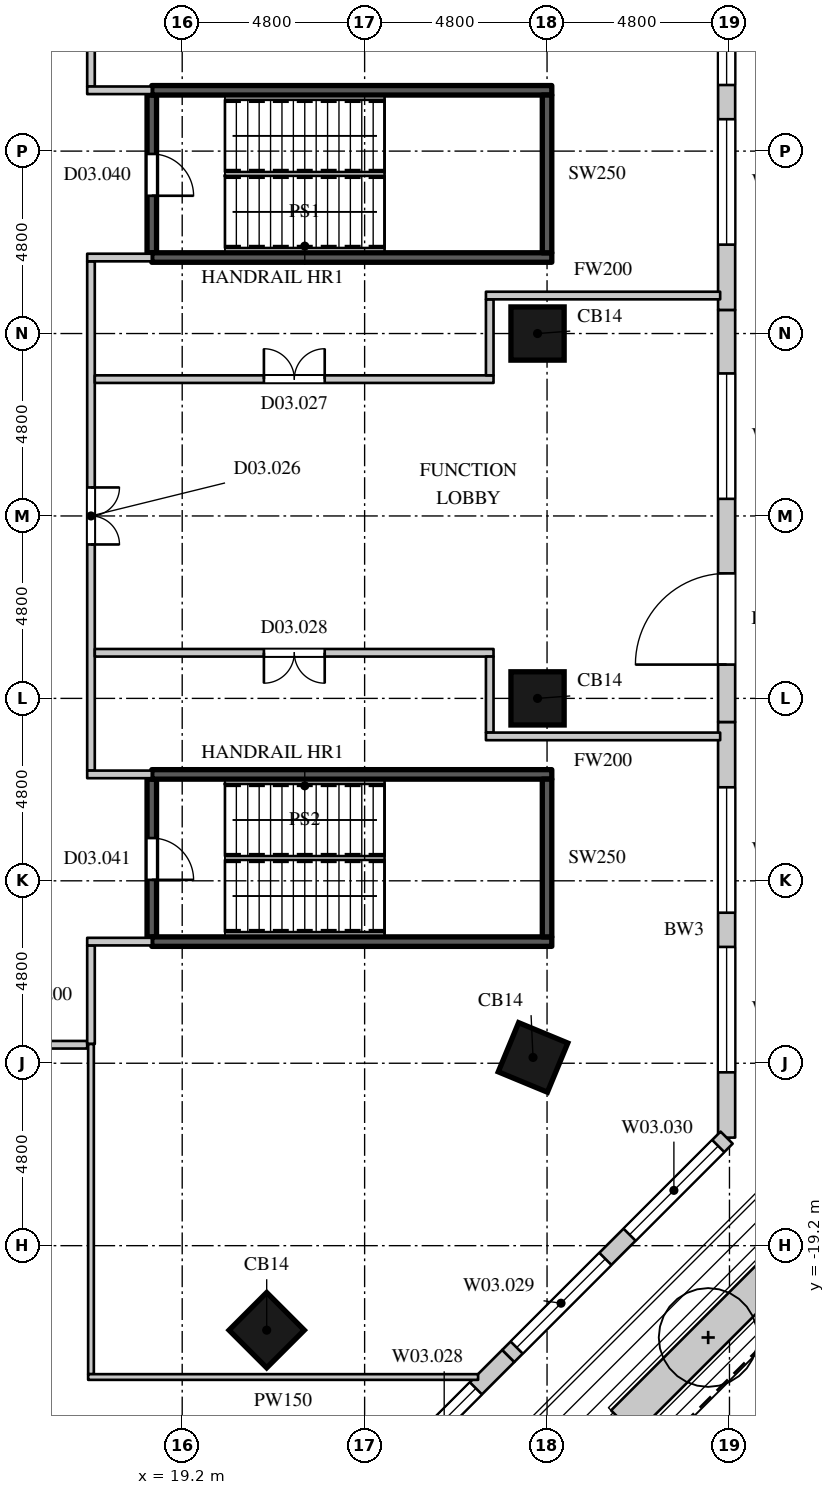
"""IFC4 building model, lengths in metres.
Left out: names, types, materials, properties, quantities, classifications, styles, units other than length and angle.
Written with IfcOpenShell. Run it as: python <this file> out.ifc"""

import sys

from ifc_helpers import new_model, si_unit, direction, frame, frame_2d, origin, origin_2d, place, context, subcontext, project, spatial, rectangle, extrude, element, fill, save


model = new_model("IFC4")
c1 = context("Model", 3, precision=1e-05, world=origin(), true_north=direction((0.0, 1.0)))
c2 = subcontext(c1, "Body", "Model", "MODEL_VIEW")
j1 = project(units=[si_unit("LENGTHUNIT", "METRE"), si_unit("PLANEANGLEUNIT", "RADIAN")], contexts=[c1])
p1 = place(None, origin())
s1 = spatial("IfcSite", under=j1, at=p1, CompositionType="ELEMENT")
p2 = place(p1, origin())
s2 = spatial("IfcBuilding", under=s1, at=p2, CompositionType="ELEMENT")
p3 = place(p2, frame((0.0, 0.0, 16.0)))
s3 = spatial("IfcBuildingStorey", under=s2, at=p3, CompositionType="ELEMENT", Elevation=16.0)
for number, where, z_axis, x_axis in (
    (1, (21.423, -21.423, 0.0), (0.0, 0.0, 1.0), (0.707, 0.707, 0.0)),
    (2, (28.431, -14.247, 0.0), (0.0, 0.0, 1.0), (0.383, 0.924, 0.0)),
    (3, (28.55, -4.8, 0.0), (0.0, 0.0, 1.0), (0.0, 1.0, 0.0)),
    (4, (28.55, 4.8, 0.0), (0.0, 0.0, 1.0), (0.0, 1.0, 0.0)),
):
    element("IfcColumn", number, at=place(p3, frame(where, z_axis=z_axis, x_axis=x_axis)), inside=s3, PredefinedType="COLUMN", context=c2, shape_type="SweptSolid", body=[
        extrude(rectangle(XDim=1.4, YDim=1.4, at=origin_2d()), origin(), (0.0, 0.0, 1.0), 5.0),
    ])
p4 = place(p3, frame((33.525, -16.357, 0.0), z_axis=(0.0, 0.0, 1.0), x_axis=(0.0, 1.0, 0.0)))
e5 = element("IfcWall", 5, at=p4, inside=s3, PredefinedType="ELEMENTEDWALL", context=c2, shape_type="SweptSolid", body=[
    extrude(rectangle(XDim=10.936, YDim=0.45, at=frame_2d((5.468, 0.0))), origin(), (0.0, 0.0, 1.0), 4.7),
])
p5 = place(p4, frame((1.718, 0.0, 1.05)))
e6 = element("IfcOpeningElement", 6, at=p5, cuts=e5, PredefinedType="OPENING", context=c2, shape_type="SweptSolid", body=[
    extrude(rectangle(XDim=3.3, YDim=2.7, at=frame_2d((1.65, 1.35))), frame((0.0, 0.235, 0.0), z_axis=(0.0, -1.0, 0.0), x_axis=(1.0, 0.0, 0.0)), (0.0, 0.0, 1.0), 0.47),
])
p6 = place(p4, frame((5.918, 0.0, 1.05)))
e7 = element("IfcOpeningElement", 7, at=p6, cuts=e5, PredefinedType="OPENING", context=c2, shape_type="SweptSolid", body=[
    extrude(rectangle(XDim=3.3, YDim=2.7, at=frame_2d((1.65, 1.35))), frame((0.0, 0.235, 0.0), z_axis=(0.0, -1.0, 0.0), x_axis=(1.0, 0.0, 0.0)), (0.0, 0.0, 1.0), 0.47),
])
p7 = place(p3, frame((33.525, -5.421, 0.0), z_axis=(0.0, 0.0, 1.0), x_axis=(0.0, 1.0, 0.0)))
e8 = element("IfcWall", 8, at=p7, inside=s3, PredefinedType="ELEMENTEDWALL", context=c2, shape_type="SweptSolid", body=[
    extrude(rectangle(XDim=10.843, YDim=0.45, at=frame_2d((5.421, 0.0))), origin(), (0.0, 0.0, 1.0), 4.7),
])
p8 = place(p7, frame((1.511, 0.0, 0.0)))
e9 = element("IfcOpeningElement", 9, at=p8, cuts=e8, PredefinedType="OPENING", context=c2, shape_type="SweptSolid", body=[
    extrude(rectangle(XDim=2.4, YDim=2.7, at=frame_2d((1.2, 1.35))), frame((0.0, 0.235, 0.0), z_axis=(0.0, -1.0, 0.0), x_axis=(1.0, 0.0, 0.0)), (0.0, 0.0, 1.0), 0.47),
])
p9 = place(p7, frame((5.871, 0.0, 1.05)))
e10 = element("IfcOpeningElement", 10, at=p9, cuts=e8, PredefinedType="OPENING", context=c2, shape_type="SweptSolid", body=[
    extrude(rectangle(XDim=3.3, YDim=2.7, at=frame_2d((1.65, 1.35))), frame((0.0, 0.235, 0.0), z_axis=(0.0, -1.0, 0.0), x_axis=(1.0, 0.0, 0.0)), (0.0, 0.0, 1.0), 0.47),
])
p10 = place(p3, frame((33.525, 5.421, 0.0), z_axis=(0.0, 0.0, 1.0), x_axis=(0.0, 1.0, 0.0)))
e11 = element("IfcWall", 11, at=p10, inside=s3, PredefinedType="ELEMENTEDWALL", context=c2, shape_type="SweptSolid", body=[
    extrude(rectangle(XDim=10.936, YDim=0.45, at=frame_2d((5.468, 0.0))), origin(), (0.0, 0.0, 1.0), 4.7),
])
p11 = place(p10, frame((1.718, 0.0, 1.05)))
e12 = element("IfcOpeningElement", 12, at=p11, cuts=e11, PredefinedType="OPENING", context=c2, shape_type="SweptSolid", body=[
    extrude(rectangle(XDim=3.3, YDim=2.7, at=frame_2d((1.65, 1.35))), frame((0.0, 0.235, 0.0), z_axis=(0.0, -1.0, 0.0), x_axis=(1.0, 0.0, 0.0)), (0.0, 0.0, 1.0), 0.47),
])
p12 = place(p10, frame((5.918, 0.0, 1.05)))
e13 = element("IfcOpeningElement", 13, at=p12, cuts=e11, PredefinedType="OPENING", context=c2, shape_type="SweptSolid", body=[
    extrude(rectangle(XDim=3.3, YDim=2.7, at=frame_2d((1.65, 1.35))), frame((0.0, 0.235, 0.0), z_axis=(0.0, -1.0, 0.0), x_axis=(1.0, 0.0, 0.0)), (0.0, 0.0, 1.0), 0.47),
])
p13 = place(p3, frame((22.102, -27.781, 0.0), z_axis=(0.0, 0.0, 1.0), x_axis=(0.707106781187, 0.707106781187, 0.0)))
e14 = element("IfcWall", 14, at=p13, inside=s3, PredefinedType="ELEMENTEDWALL", context=c2, shape_type="SweptSolid", body=[
    extrude(rectangle(XDim=8.031, YDim=0.45, at=frame_2d((4.016, 0.0))), origin(), (0.0, 0.0, 1.0), 4.7),
])
p14 = place(p13, frame((0.265, 0.0, 1.05)))
e15 = element("IfcOpeningElement", 15, at=p14, cuts=e14, PredefinedType="OPENING", context=c2, shape_type="SweptSolid", body=[
    extrude(rectangle(XDim=3.3, YDim=2.7, at=frame_2d((1.65, 1.35))), frame((0.0, 0.235, 0.0), z_axis=(0.0, -1.0, 0.0), x_axis=(1.0, 0.0, 0.0)), (0.0, 0.0, 1.0), 0.47),
])
p15 = place(p13, frame((4.465, 0.0, 1.05)))
e16 = element("IfcOpeningElement", 16, at=p15, cuts=e14, PredefinedType="OPENING", context=c2, shape_type="SweptSolid", body=[
    extrude(rectangle(XDim=2.36, YDim=2.7, at=frame_2d((1.18, 1.35))), frame((0.0, 0.235, 0.0), z_axis=(0.0, -1.0, 0.0), x_axis=(1.0, 0.0, 0.0)), (0.0, 0.0, 1.0), 0.47),
])
p16 = place(p3, frame((27.781, -22.102, 0.0), z_axis=(0.0, 0.0, 1.0), x_axis=(0.707091755064, 0.70712180699, 0.0)))
e17 = element("IfcWall", 17, at=p16, inside=s3, PredefinedType="ELEMENTEDWALL", context=c2, shape_type="SweptSolid", body=[
    extrude(rectangle(XDim=8.124, YDim=0.45, at=frame_2d((4.062, 0.0))), origin(), (0.0, 0.0, 1.0), 4.7),
])
p17 = place(p16, frame((0.312, 0.0, 1.05)))
e18 = element("IfcOpeningElement", 18, at=p17, cuts=e17, PredefinedType="OPENING", context=c2, shape_type="SweptSolid", body=[
    extrude(rectangle(XDim=3.3, YDim=2.7, at=frame_2d((1.65, 1.35))), frame((0.0, 0.235, 0.0), z_axis=(0.0, -1.0, 0.0), x_axis=(1.0, 0.0, 0.0)), (0.0, 0.0, 1.0), 0.47),
])
p18 = place(p16, frame((4.512, 0.0, 1.05)))
e19 = element("IfcOpeningElement", 19, at=p18, cuts=e17, PredefinedType="OPENING", context=c2, shape_type="SweptSolid", body=[
    extrude(rectangle(XDim=3.3, YDim=2.7, at=frame_2d((1.65, 1.35))), frame((0.0, 0.235, 0.0), z_axis=(0.0, -1.0, 0.0), x_axis=(1.0, 0.0, 0.0)), (0.0, 0.0, 1.0), 0.47),
])
p19 = place(p3, frame((30.803, -23.852, 0.0), z_axis=(0.0, 0.0, 1.0), x_axis=(0.707126083377, 0.70708747847, 0.0)))
e20 = element("IfcWall", 20, at=p19, inside=s3, PredefinedType="USERDEFINED", context=c2, shape_type="SweptSolid", body=[
    extrude(rectangle(XDim=6.324, YDim=0.9, at=frame_2d((3.162, 0.0))), origin(), (0.0, 0.0, 1.0), 0.9),
])
p20 = place(p3, frame((11.1, -13.914, 0.0), z_axis=(0.0, 0.0, 1.0), x_axis=(1.0, 0.0, 0.0)))
e21 = element("IfcWall", 21, at=p20, inside=s3, PredefinedType="PARTITIONING", context=c2, shape_type="SweptSolid", body=[
    extrude(rectangle(XDim=5.6, YDim=0.2, at=frame_2d((2.8, 0.0))), origin(), (0.0, 0.0, 1.0), 4.4),
])
p21 = place(p3, frame((16.8, -13.894, 0.0), z_axis=(0.0, 0.0, 1.0), x_axis=(0.0, 1.0, 0.0)))
e22 = element("IfcWall", 22, at=p21, inside=s3, PredefinedType="PARTITIONING", context=c2, shape_type="SweptSolid", body=[
    extrude(rectangle(XDim=2.594, YDim=0.2, at=frame_2d((1.297, 0.0))), origin(), (0.0, 0.0, 1.0), 4.4),
])
p22 = place(p3, frame((16.7, -11.2, 0.0), z_axis=(0.0, 0.0, 1.0), x_axis=(1.0, 0.0, 0.0)))
e23 = element("IfcWall", 23, at=p22, inside=s3, PredefinedType="PARTITIONING", context=c2, shape_type="SweptSolid", body=[
    extrude(rectangle(XDim=1.7, YDim=0.2, at=frame_2d((0.85, 0.0))), origin(), (0.0, 0.0, 1.0), 4.4),
])
p23 = place(p3, frame((16.8, -6.7, 0.0), z_axis=(0.0, 0.0, 1.0), x_axis=(0.0, 1.0, 0.0)))
e24 = element("IfcWall", 24, at=p23, inside=s3, PredefinedType="PARTITIONING", context=c2, shape_type="SweptSolid", body=[
    extrude(rectangle(XDim=13.4, YDim=0.2, at=frame_2d((6.7, 0.0))), origin(), (0.0, 0.0, 1.0), 4.4),
])
p24 = place(p23, frame((5.95, 0.0, 0.0)))
e25 = element("IfcOpeningElement", 25, at=p24, cuts=e24, PredefinedType="OPENING", context=c2, shape_type="SweptSolid", body=[
    extrude(rectangle(XDim=1.5, YDim=2.2, at=frame_2d((0.75, 1.1))), frame((0.0, 0.11, 0.0), z_axis=(0.0, -1.0, 0.0), x_axis=(1.0, 0.0, 0.0)), (0.0, 0.0, 1.0), 0.22),
])
p25 = place(p3, frame((16.7, -6.8, 0.0), z_axis=(0.0, 0.0, 1.0), x_axis=(1.0, 0.0, 0.0)))
e26 = element("IfcWall", 26, at=p25, inside=s3, PredefinedType="PARTITIONING", context=c2, shape_type="SweptSolid", body=[
    extrude(rectangle(XDim=1.7, YDim=0.2, at=frame_2d((0.85, 0.0))), origin(), (0.0, 0.0, 1.0), 4.4),
])
p26 = place(p3, frame((16.9, -3.6, 0.0), z_axis=(0.0, 0.0, 1.0), x_axis=(1.0, 0.0, 0.0)))
e27 = element("IfcWall", 27, at=p26, inside=s3, PredefinedType="PARTITIONING", context=c2, shape_type="SweptSolid", body=[
    extrude(rectangle(XDim=10.492, YDim=0.2, at=frame_2d((5.246, 0.0))), origin(), (0.0, 0.0, 1.0), 4.4),
])
p27 = place(p26, frame((4.45, 0.0, 0.0)))
e28 = element("IfcOpeningElement", 28, at=p27, cuts=e27, PredefinedType="OPENING", context=c2, shape_type="SweptSolid", body=[
    extrude(rectangle(XDim=1.6, YDim=2.4, at=frame_2d((0.8, 1.2))), frame((0.0, 0.11, 0.0), z_axis=(0.0, -1.0, 0.0), x_axis=(1.0, 0.0, 0.0)), (0.0, 0.0, 1.0), 0.22),
])
p28 = place(p3, frame((16.9, 3.6, 0.0), z_axis=(0.0, 0.0, 1.0), x_axis=(1.0, 0.0, 0.0)))
e29 = element("IfcWall", 29, at=p28, inside=s3, PredefinedType="PARTITIONING", context=c2, shape_type="SweptSolid", body=[
    extrude(rectangle(XDim=10.492, YDim=0.2, at=frame_2d((5.246, 0.0))), origin(), (0.0, 0.0, 1.0), 4.4),
])
p29 = place(p28, frame((4.45, 0.0, 0.0)))
e30 = element("IfcOpeningElement", 30, at=p29, cuts=e29, PredefinedType="OPENING", context=c2, shape_type="SweptSolid", body=[
    extrude(rectangle(XDim=1.6, YDim=2.4, at=frame_2d((0.8, 1.2))), frame((0.0, 0.11, 0.0), z_axis=(0.0, -1.0, 0.0), x_axis=(1.0, 0.0, 0.0)), (0.0, 0.0, 1.0), 0.22),
])
p30 = place(p3, frame((16.7, 6.8, 0.0), z_axis=(0.0, 0.0, 1.0), x_axis=(1.0, 0.0, 0.0)))
e31 = element("IfcWall", 31, at=p30, inside=s3, PredefinedType="PARTITIONING", context=c2, shape_type="SweptSolid", body=[
    extrude(rectangle(XDim=1.7, YDim=0.2, at=frame_2d((0.85, 0.0))), origin(), (0.0, 0.0, 1.0), 4.4),
])
p31 = place(p3, frame((16.8, 11.3, 0.0), z_axis=(0.0, 0.0, 1.0), x_axis=(0.0, 1.0, 0.0)))
e32 = element("IfcWall", 32, at=p31, inside=s3, PredefinedType="PARTITIONING", context=c2, shape_type="SweptSolid", body=[
    extrude(rectangle(XDim=3.937, YDim=0.2, at=frame_2d((1.968, 0.0))), origin(), (0.0, 0.0, 1.0), 4.4),
])
p32 = place(p3, frame((16.7, 11.2, 0.0), z_axis=(0.0, 0.0, 1.0), x_axis=(1.0, 0.0, 0.0)))
e33 = element("IfcWall", 33, at=p32, inside=s3, PredefinedType="PARTITIONING", context=c2, shape_type="SweptSolid", body=[
    extrude(rectangle(XDim=1.7, YDim=0.2, at=frame_2d((0.85, 0.0))), origin(), (0.0, 0.0, 1.0), 4.4),
])
p33 = place(p3, frame((27.292, -5.7, 0.0), z_axis=(0.0, 0.0, 1.0), x_axis=(0.0, 1.0, 0.0)))
e34 = element("IfcWall", 34, at=p33, inside=s3, PredefinedType="PARTITIONING", context=c2, shape_type="SweptSolid", body=[
    extrude(rectangle(XDim=2.0, YDim=0.2, at=frame_2d((1.0, 0.0))), origin(), (0.0, 0.0, 1.0), 4.4),
])
p34 = place(p3, frame((27.192, -5.8, 0.0), z_axis=(0.0, 0.0, 1.0), x_axis=(1.0, 0.0, 0.0)))
e35 = element("IfcWall", 35, at=p34, inside=s3, PredefinedType="PARTITIONING", context=c2, shape_type="SweptSolid", body=[
    extrude(rectangle(XDim=6.163, YDim=0.2, at=frame_2d((3.082, 0.0))), origin(), (0.0, 0.0, 1.0), 4.4),
])
p35 = place(p3, frame((27.292, 3.7, 0.0), z_axis=(0.0, 0.0, 1.0), x_axis=(0.0, 1.0, 0.0)))
e36 = element("IfcWall", 36, at=p35, inside=s3, PredefinedType="PARTITIONING", context=c2, shape_type="SweptSolid", body=[
    extrude(rectangle(XDim=2.0, YDim=0.2, at=frame_2d((1.0, 0.0))), origin(), (0.0, 0.0, 1.0), 4.4),
])
p36 = place(p3, frame((27.192, 5.8, 0.0), z_axis=(0.0, 0.0, 1.0), x_axis=(1.0, 0.0, 0.0)))
e37 = element("IfcWall", 37, at=p36, inside=s3, PredefinedType="PARTITIONING", context=c2, shape_type="SweptSolid", body=[
    extrude(rectangle(XDim=6.163, YDim=0.2, at=frame_2d((3.082, 0.0))), origin(), (0.0, 0.0, 1.0), 4.4),
])
p37 = place(p3, frame((16.8, -22.581, 0.0), z_axis=(0.0, 0.0, 1.0), x_axis=(0.0, 1.0, 0.0)))
e38 = element("IfcWall", 38, at=p37, inside=s3, PredefinedType="PARTITIONING", context=c2, shape_type="SweptSolid", body=[
    extrude(rectangle(XDim=8.687, YDim=0.15, at=frame_2d((4.344, 0.0))), origin(), (0.0, 0.0, 1.0), 4.4),
])
p38 = place(p3, frame((16.725, -22.656, 0.0), z_axis=(0.0, 0.0, 1.0), x_axis=(1.0, 0.0, 0.0)))
e39 = element("IfcWall", 39, at=p38, inside=s3, PredefinedType="PARTITIONING", context=c2, shape_type="SweptSolid", body=[
    extrude(rectangle(XDim=10.261, YDim=0.15, at=frame_2d((5.13, 0.0))), origin(), (0.0, 0.0, 1.0), 4.4),
])
p39 = place(p3, frame((18.4, -11.075, 0.0), z_axis=(0.0, 0.0, 1.0), x_axis=(0.0, 1.0, 0.0)))
e40 = element("IfcWall", 40, at=p39, inside=s3, PredefinedType="SHEAR", context=c2, shape_type="SweptSolid", body=[
    extrude(rectangle(XDim=4.15, YDim=0.25, at=frame_2d((2.075, 0.0))), origin(), (0.0, 0.0, 1.0), 4.65),
])
p40 = place(p39, frame((1.5, 0.0, 0.0)))
e41 = element("IfcOpeningElement", 41, at=p40, cuts=e40, PredefinedType="OPENING", context=c2, shape_type="SweptSolid", body=[
    extrude(rectangle(XDim=1.1, YDim=2.2, at=frame_2d((0.55, 1.1))), frame((0.0, 0.135, 0.0), z_axis=(0.0, -1.0, 0.0), x_axis=(1.0, 0.0, 0.0)), (0.0, 0.0, 1.0), 0.27),
])
for number, where, z_axis, x_axis in (
    (42, (18.4, -11.2, 0.0), (0.0, 0.0, 1.0), (1.0, 0.0, 0.0)),
    (43, (18.4, -6.8, 0.0), (0.0, 0.0, 1.0), (1.0, 0.0, 0.0)),
):
    element("IfcWall", number, at=place(p3, frame(where, z_axis=z_axis, x_axis=x_axis)), inside=s3, PredefinedType="SHEAR", context=c2, shape_type="SweptSolid", body=[
        extrude(rectangle(XDim=10.525, YDim=0.25, at=frame_2d((5.263, 0.0))), origin(), (0.0, 0.0, 1.0), 4.65),
    ])
p41 = place(p3, frame((18.4, 6.925, 0.0), z_axis=(0.0, 0.0, 1.0), x_axis=(0.0, 1.0, 0.0)))
e44 = element("IfcWall", 44, at=p41, inside=s3, PredefinedType="SHEAR", context=c2, shape_type="SweptSolid", body=[
    extrude(rectangle(XDim=4.15, YDim=0.25, at=frame_2d((2.075, 0.0))), origin(), (0.0, 0.0, 1.0), 4.65),
])
p42 = place(p41, frame((1.5, 0.0, 0.0)))
e45 = element("IfcOpeningElement", 45, at=p42, cuts=e44, PredefinedType="OPENING", context=c2, shape_type="SweptSolid", body=[
    extrude(rectangle(XDim=1.1, YDim=2.2, at=frame_2d((0.55, 1.1))), frame((0.0, 0.135, 0.0), z_axis=(0.0, -1.0, 0.0), x_axis=(1.0, 0.0, 0.0)), (0.0, 0.0, 1.0), 0.27),
])
for number, where, z_axis, x_axis in (
    (46, (18.4, 6.8, 0.0), (0.0, 0.0, 1.0), (1.0, 0.0, 0.0)),
    (47, (18.4, 11.2, 0.0), (0.0, 0.0, 1.0), (1.0, 0.0, 0.0)),
):
    element("IfcWall", number, at=place(p3, frame(where, z_axis=z_axis, x_axis=x_axis)), inside=s3, PredefinedType="SHEAR", context=c2, shape_type="SweptSolid", body=[
        extrude(rectangle(XDim=10.525, YDim=0.25, at=frame_2d((5.263, 0.0))), origin(), (0.0, 0.0, 1.0), 4.65),
    ])
for number, where, z_axis, x_axis in (
    (48, (28.8, -11.075, 0.0), (0.0, 0.0, 1.0), (0.0, 1.0, 0.0)),
    (49, (28.8, 6.925, 0.0), (0.0, 0.0, 1.0), (0.0, 1.0, 0.0)),
):
    element("IfcWall", number, at=place(p3, frame(where, z_axis=z_axis, x_axis=x_axis)), inside=s3, PredefinedType="SHEAR", context=c2, shape_type="SweptSolid", body=[
        extrude(rectangle(XDim=4.15, YDim=0.25, at=frame_2d((2.075, 0.0))), origin(), (0.0, 0.0, 1.0), 4.65),
    ])
p43 = place(p5, origin())
e50 = element("IfcWindow", 50, at=p43, inside=s3, PartitioningType="SINGLE_PANEL", PredefinedType="WINDOW", context=c2, shape_type="SweptSolid", body=[
    extrude(rectangle(XDim=3.3, YDim=2.7, at=frame_2d((1.65, 1.35))), frame((0.0, 0.135, 0.0), z_axis=(0.0, -1.0, 0.0), x_axis=(1.0, 0.0, 0.0)), (0.0, 0.0, 1.0), 0.06),
])
fill(e6, e50)
p44 = place(p6, origin())
e51 = element("IfcWindow", 51, at=p44, inside=s3, PartitioningType="SINGLE_PANEL", PredefinedType="WINDOW", context=c2, shape_type="SweptSolid", body=[
    extrude(rectangle(XDim=3.3, YDim=2.7, at=frame_2d((1.65, 1.35))), frame((0.0, 0.135, 0.0), z_axis=(0.0, -1.0, 0.0), x_axis=(1.0, 0.0, 0.0)), (0.0, 0.0, 1.0), 0.06),
])
fill(e7, e51)
p45 = place(p8, origin())
e52 = element("IfcDoor", 52, at=p45, inside=s3, OperationType="SINGLE_SWING_LEFT", PredefinedType="DOOR", context=c2, shape_type="SweptSolid", body=[
    extrude(rectangle(XDim=2.4, YDim=2.7, at=frame_2d((1.2, 1.35))), frame((0.0, 0.13, 0.0), z_axis=(0.0, -1.0, 0.0), x_axis=(1.0, 0.0, 0.0)), (0.0, 0.0, 1.0), 0.05),
])
fill(e9, e52)
p46 = place(p9, origin())
e53 = element("IfcWindow", 53, at=p46, inside=s3, PartitioningType="SINGLE_PANEL", PredefinedType="WINDOW", context=c2, shape_type="SweptSolid", body=[
    extrude(rectangle(XDim=3.3, YDim=2.7, at=frame_2d((1.65, 1.35))), frame((0.0, 0.135, 0.0), z_axis=(0.0, -1.0, 0.0), x_axis=(1.0, 0.0, 0.0)), (0.0, 0.0, 1.0), 0.06),
])
fill(e10, e53)
p47 = place(p11, origin())
e54 = element("IfcWindow", 54, at=p47, inside=s3, PartitioningType="SINGLE_PANEL", PredefinedType="WINDOW", context=c2, shape_type="SweptSolid", body=[
    extrude(rectangle(XDim=3.3, YDim=2.7, at=frame_2d((1.65, 1.35))), frame((0.0, 0.135, 0.0), z_axis=(0.0, -1.0, 0.0), x_axis=(1.0, 0.0, 0.0)), (0.0, 0.0, 1.0), 0.06),
])
fill(e12, e54)
p48 = place(p12, origin())
e55 = element("IfcWindow", 55, at=p48, inside=s3, PartitioningType="SINGLE_PANEL", PredefinedType="WINDOW", context=c2, shape_type="SweptSolid", body=[
    extrude(rectangle(XDim=3.3, YDim=2.7, at=frame_2d((1.65, 1.35))), frame((0.0, 0.135, 0.0), z_axis=(0.0, -1.0, 0.0), x_axis=(1.0, 0.0, 0.0)), (0.0, 0.0, 1.0), 0.06),
])
fill(e13, e55)
p49 = place(p15, origin())
e56 = element("IfcWindow", 56, at=p49, inside=s3, PartitioningType="SINGLE_PANEL", PredefinedType="WINDOW", context=c2, shape_type="SweptSolid", body=[
    extrude(rectangle(XDim=2.36, YDim=2.7, at=frame_2d((1.18, 1.35))), frame((0.0, 0.135, 0.0), z_axis=(0.0, -1.0, 0.0), x_axis=(1.0, 0.0, 0.0)), (0.0, 0.0, 1.0), 0.06),
])
fill(e16, e56)
p50 = place(p17, origin())
e57 = element("IfcWindow", 57, at=p50, inside=s3, PartitioningType="SINGLE_PANEL", PredefinedType="WINDOW", context=c2, shape_type="SweptSolid", body=[
    extrude(rectangle(XDim=3.3, YDim=2.7, at=frame_2d((1.65, 1.35))), frame((0.0, 0.135, 0.0), z_axis=(0.0, -1.0, 0.0), x_axis=(1.0, 0.0, 0.0)), (0.0, 0.0, 1.0), 0.06),
])
fill(e18, e57)
p51 = place(p18, origin())
e58 = element("IfcWindow", 58, at=p51, inside=s3, PartitioningType="SINGLE_PANEL", PredefinedType="WINDOW", context=c2, shape_type="SweptSolid", body=[
    extrude(rectangle(XDim=3.3, YDim=2.7, at=frame_2d((1.65, 1.35))), frame((0.0, 0.135, 0.0), z_axis=(0.0, -1.0, 0.0), x_axis=(1.0, 0.0, 0.0)), (0.0, 0.0, 1.0), 0.06),
])
fill(e19, e58)
p52 = place(p24, origin())
e59 = element("IfcDoor", 59, at=p52, inside=s3, OperationType="DOUBLE_DOOR_SINGLE_SWING", PredefinedType="DOOR", context=c2, shape_type="SweptSolid", body=[
    extrude(rectangle(XDim=1.5, YDim=2.2, at=frame_2d((0.75, 1.1))), frame((0.0, 0.025, 0.0), z_axis=(0.0, -1.0, 0.0), x_axis=(1.0, 0.0, 0.0)), (0.0, 0.0, 1.0), 0.05),
])
fill(e25, e59)
p53 = place(p29, origin())
e60 = element("IfcDoor", 60, at=p53, inside=s3, OperationType="DOUBLE_DOOR_SINGLE_SWING", PredefinedType="DOOR", context=c2, shape_type="SweptSolid", body=[
    extrude(rectangle(XDim=1.6, YDim=2.4, at=frame_2d((0.8, 1.2))), frame((0.0, 0.025, 0.0), z_axis=(0.0, -1.0, 0.0), x_axis=(1.0, 0.0, 0.0)), (0.0, 0.0, 1.0), 0.05),
])
fill(e30, e60)
p54 = place(p27, origin())
e61 = element("IfcDoor", 61, at=p54, inside=s3, OperationType="DOUBLE_DOOR_SINGLE_SWING", PredefinedType="DOOR", context=c2, shape_type="SweptSolid", body=[
    extrude(rectangle(XDim=1.6, YDim=2.4, at=frame_2d((0.8, 1.2))), frame((0.0, 0.025, 0.0), z_axis=(0.0, -1.0, 0.0), x_axis=(1.0, 0.0, 0.0)), (0.0, 0.0, 1.0), 0.05),
])
fill(e28, e61)
p55 = place(p42, origin())
e62 = element("IfcDoor", 62, at=p55, inside=s3, OperationType="SINGLE_SWING_RIGHT", PredefinedType="DOOR", context=c2, shape_type="SweptSolid", body=[
    extrude(rectangle(XDim=1.1, YDim=2.2, at=frame_2d((0.55, 1.1))), frame((0.0, 0.025, 0.0), z_axis=(0.0, -1.0, 0.0), x_axis=(1.0, 0.0, 0.0)), (0.0, 0.0, 1.0), 0.05),
])
fill(e45, e62)
p56 = place(p40, origin())
e63 = element("IfcDoor", 63, at=p56, inside=s3, OperationType="SINGLE_SWING_RIGHT", PredefinedType="DOOR", context=c2, shape_type="SweptSolid", body=[
    extrude(rectangle(XDim=1.1, YDim=2.2, at=frame_2d((0.55, 1.1))), frame((0.0, 0.025, 0.0), z_axis=(0.0, -1.0, 0.0), x_axis=(1.0, 0.0, 0.0)), (0.0, 0.0, 1.0), 0.05),
])
fill(e41, e63)
save(model, sys.argv[1])
